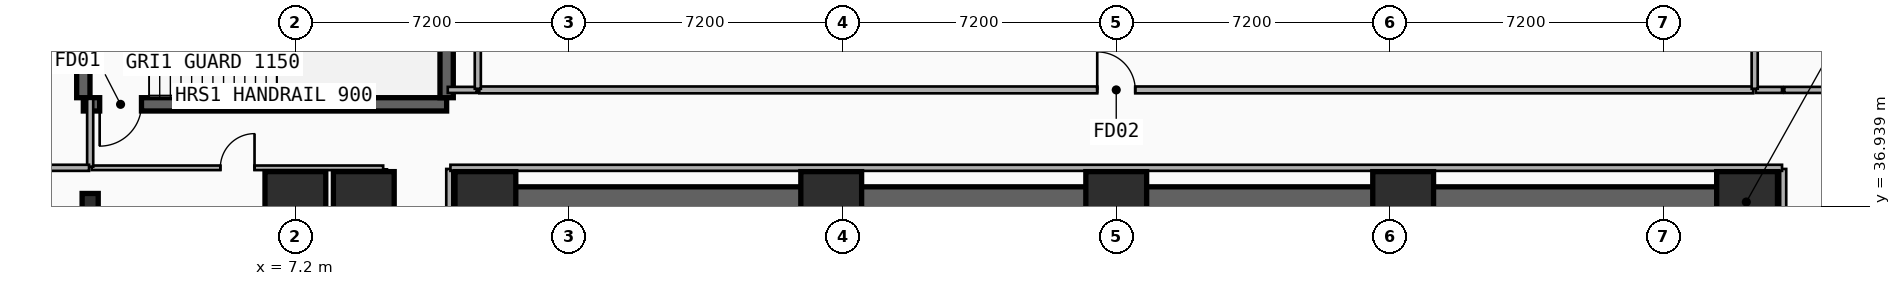
"""IFC4 building model, lengths in metres.
Left out: names, types, materials, properties, quantities, classifications, styles, units other than length and angle.
Written with IfcOpenShell. Run it as: python <this file> out.ifc"""

import sys

from ifc_helpers import new_model, si_unit, direction, frame, frame_2d, origin, origin_2d, place, context, subcontext, project, spatial, rectangle, i_section, extrude, element, fill, save


model = new_model("IFC4")
c1 = context("Model", 3, precision=1e-05, world=origin(), true_north=direction((0.0, 1.0)))
c2 = subcontext(c1, "Body", "Model", "MODEL_VIEW")
j1 = project(units=[si_unit("LENGTHUNIT", "METRE"), si_unit("PLANEANGLEUNIT", "RADIAN")], contexts=[c1])
p1 = place(None, origin())
s1 = spatial("IfcSite", under=j1, at=p1, CompositionType="ELEMENT")
p2 = place(p1, origin())
s2 = spatial("IfcBuilding", under=s1, at=p2, CompositionType="ELEMENT")
p3 = place(p2, frame((0.0, 0.0, 19.4)))
s3 = spatial("IfcBuildingStorey", under=s2, at=p3, CompositionType="ELEMENT", Elevation=19.4)
p4 = place(p3, frame((12.15, 37.05, 0.0), z_axis=(0.0, 0.0, 1.0), x_axis=(1.0, 0.0, 0.0)))
e1 = element("IfcWall", 1, at=p4, inside=s3, PredefinedType="SHEAR", context=c2, shape_type="SweptSolid", body=[
    extrude(rectangle(XDim=33.23, YDim=0.8, at=frame_2d((16.615, 0.0))), origin(), (0.0, 0.0, 1.0), 4.8),
])
p5 = place(p3, frame((11.18, 39.62, 0.0), z_axis=(0.0, 0.0, 1.0), x_axis=(-1.0, 0.0, 0.0)))
e2 = element("IfcWall", 2, at=p5, inside=s3, PredefinedType="SHEAR", context=c2, shape_type="SweptSolid", body=[
    extrude(rectangle(XDim=9.56, YDim=0.35, at=frame_2d((4.78, 0.0))), origin(), (0.0, 0.0, 1.0), 4.8),
])
p6 = place(p5, frame((8.03, 0.0, 0.0)))
e3 = element("IfcOpeningElement", 3, at=p6, cuts=e2, PredefinedType="OPENING", context=c2, shape_type="SweptSolid", body=[
    extrude(rectangle(XDim=1.1, YDim=2.15, at=frame_2d((0.55, 1.075))), frame((0.0, 0.185, 0.0), z_axis=(0.0, -1.0, 0.0), x_axis=(1.0, 0.0, 0.0)), (0.0, 0.0, 1.0), 0.37),
])
for number, where, z_axis, x_axis in (
    (4, (1.62, 39.795, 0.0), (0.0, 0.0, 1.0), (0.0, 1.0, 0.0)),
    (5, (11.18, 39.795, 0.0), (0.0, 0.0, 1.0), (0.0, 1.0, 0.0)),
):
    element("IfcWall", number, at=place(p3, frame(where, z_axis=z_axis, x_axis=x_axis)), inside=s3, PredefinedType="SHEAR", context=c2, shape_type="SweptSolid", body=[
        extrude(rectangle(XDim=3.27, YDim=0.35, at=frame_2d((1.635, 0.0))), origin(), (0.0, 0.0, 1.0), 4.8),
    ])
for number, where, z_axis, x_axis in (
    (6, (12.2, 37.05, 0.0), (0.0, 0.0, 1.0), (1.0, 0.0, 0.0)),
    (7, (21.3, 37.05, 0.0), (0.0, 0.0, 1.0), (1.0, 0.0, 0.0)),
    (8, (28.8, 37.05, 0.0), (0.0, 0.0, 1.0), (1.0, 0.0, 0.0)),
    (9, (36.35, 37.05, 0.0), (0.0, 0.0, 1.0), (1.0, 0.0, 0.0)),
    (10, (45.4, 37.05, 0.0), (0.0, 0.0, 1.0), (1.0, 0.0, 0.0)),
):
    element("IfcColumn", number, at=place(p3, frame(where, z_axis=z_axis, x_axis=x_axis)), inside=s3, PredefinedType="COLUMN", context=c2, shape_type="SweptSolid", body=[
        extrude(rectangle(XDim=1.6, YDim=1.6, at=origin_2d()), origin(), (0.0, 0.0, 1.0), 4.8),
    ])
p7 = place(p3, frame((1.8, 37.05, 0.0), z_axis=(0.0, 0.0, 1.0), x_axis=(1.0, 0.0, 0.0)))
e11 = element("IfcColumn", 11, at=p7, inside=s3, PredefinedType="COLUMN", context=c2, shape_type="SweptSolid", body=[
    extrude(i_section(OverallWidth=0.424, OverallDepth=0.45, WebThickness=0.041, FlangeThickness=0.065, FilletRadius=0.015, at=origin_2d()), origin(), (0.0, 0.0, 1.0), 4.8),
])
for number, where, z_axis, x_axis in (
    (12, (7.2, 37.05, 0.0), (0.0, 0.0, 1.0), (1.0, 0.0, 0.0)),
    (13, (9.0, 37.05, 0.0), (0.0, 0.0, 1.0), (1.0, 0.0, 0.0)),
):
    element("IfcColumn", number, at=place(p3, frame(where, z_axis=z_axis, x_axis=x_axis)), inside=s3, PredefinedType="COLUMN", context=c2, shape_type="SweptSolid", body=[
        extrude(rectangle(XDim=1.6, YDim=1.6, at=origin_2d()), origin(), (0.0, 0.0, 1.0), 4.8),
    ])
p8 = place(p3, frame((9.55, 27.64, 0.0), z_axis=(0.0, 0.0, 1.0), x_axis=(0.0, 1.0, 0.0)))
e14 = element("IfcWall", 14, at=p8, inside=s3, PredefinedType="PARTITIONING", context=c2, shape_type="SweptSolid", body=[
    extrude(rectangle(XDim=10.27, YDim=0.12, at=frame_2d((5.135, 0.0))), origin(), (0.0, 0.0, 1.0), 4.5),
])
p9 = place(p8, frame((4.685, 0.0, 0.0)))
e15 = element("IfcOpeningElement", 15, at=p9, cuts=e14, PredefinedType="OPENING", context=c2, shape_type="SweptSolid", body=[
    extrude(rectangle(XDim=0.9, YDim=2.1, at=frame_2d((0.45, 1.05))), frame((0.0, 0.07, 0.0), z_axis=(0.0, -1.0, 0.0), x_axis=(1.0, 0.0, 0.0)), (0.0, 0.0, 1.0), 0.14),
])
p10 = place(p3, frame((1.84, 37.95, 0.0), z_axis=(0.0, 0.0, 1.0), x_axis=(1.0, 0.0, 0.0)))
e16 = element("IfcWall", 16, at=p10, inside=s3, PredefinedType="PARTITIONING", context=c2, shape_type="SweptSolid", body=[
    extrude(rectangle(XDim=7.67, YDim=0.12, at=frame_2d((3.835, 0.0))), origin(), (0.0, 0.0, 1.0), 4.5),
])
p11 = place(p10, frame((3.385, 0.0, 0.0)))
e17 = element("IfcOpeningElement", 17, at=p11, cuts=e16, PredefinedType="OPENING", context=c2, shape_type="SweptSolid", body=[
    extrude(rectangle(XDim=0.9, YDim=2.1, at=frame_2d((0.45, 1.05))), frame((0.0, 0.07, 0.0), z_axis=(0.0, -1.0, 0.0), x_axis=(1.0, 0.0, 0.0)), (0.0, 0.0, 1.0), 0.14),
])
p12 = place(p3, frame((12.04, 40.0, 0.0), z_axis=(0.0, 0.0, 1.0), x_axis=(1.0, 0.0, 0.0)))
e18 = element("IfcWall", 18, at=p12, inside=s3, PredefinedType="PLUMBINGWALL", context=c2, shape_type="SweptSolid", body=[
    extrude(rectangle(XDim=33.52, YDim=0.18, at=frame_2d((16.76, 0.0))), origin(), (0.0, 0.0, 1.0), 3.83),
])
p13 = place(p12, frame((16.26, 0.0, 0.0)))
e19 = element("IfcOpeningElement", 19, at=p13, cuts=e18, PredefinedType="OPENING", context=c2, shape_type="SweptSolid", body=[
    extrude(rectangle(XDim=1.0, YDim=2.15, at=frame_2d((0.5, 1.075))), frame((0.0, 0.1, 0.0), z_axis=(0.0, -1.0, 0.0), x_axis=(1.0, 0.0, 0.0)), (0.0, 0.0, 1.0), 0.2),
])
p14 = place(p3, frame((11.25, 27.63, 0.0), z_axis=(0.0, 0.0, 1.0), x_axis=(0.0, 1.0, 0.0)))
e20 = element("IfcWall", 20, at=p14, inside=s3, PredefinedType="PARTITIONING", context=c2, shape_type="SweptSolid", body=[
    extrude(rectangle(XDim=10.29, YDim=0.16, at=frame_2d((5.145, 0.0))), origin(), (0.0, 0.0, 1.0), 4.5),
])
p15 = place(p3, frame((46.38, 40.0, 0.0), z_axis=(0.0, 0.0, 1.0), x_axis=(1.0, 0.0, 0.0)))
e21 = element("IfcWall", 21, at=p15, inside=s3, PredefinedType="PARTITIONING", context=c2, shape_type="SweptSolid", body=[
    extrude(rectangle(XDim=1.64, YDim=0.16, at=frame_2d((0.82, 0.0))), origin(), (0.0, 0.0, 1.0), 4.5),
])
p16 = place(p3, frame((46.35, 27.63, 0.0), z_axis=(0.0, 0.0, 1.0), x_axis=(0.0, 1.0, 0.0)))
e22 = element("IfcWall", 22, at=p16, inside=s3, PredefinedType="PARTITIONING", context=c2, shape_type="SweptSolid", body=[
    extrude(rectangle(XDim=10.29, YDim=0.16, at=frame_2d((5.145, 0.0))), origin(), (0.0, 0.0, 1.0), 4.5),
])
p17 = place(p3, frame((11.28, 37.95, 0.0), z_axis=(0.0, 0.0, 1.0), x_axis=(1.0, 0.0, 0.0)))
e23 = element("IfcWall", 23, at=p17, inside=s3, PredefinedType="PARTITIONING", context=c2, shape_type="SweptSolid", body=[
    extrude(rectangle(XDim=35.04, YDim=0.16, at=frame_2d((17.52, 0.0))), origin(), (0.0, 0.0, 1.0), 3.83),
])
p18 = place(p3, frame((11.21, 40.0, 0.0), z_axis=(0.0, 0.0, 1.0), x_axis=(1.0, 0.0, 0.0)))
e24 = element("IfcWall", 24, at=p18, inside=s3, PredefinedType="PARTITIONING", context=c2, shape_type="SweptSolid", body=[
    extrude(rectangle(XDim=0.76, YDim=0.16, at=frame_2d((0.38, 0.0))), origin(), (0.0, 0.0, 1.0), 3.83),
])
p19 = place(p3, frame((45.63, 40.0, 0.0), z_axis=(0.0, 0.0, 1.0), x_axis=(1.0, 0.0, 0.0)))
e25 = element("IfcWall", 25, at=p19, inside=s3, PredefinedType="PARTITIONING", context=c2, shape_type="SweptSolid", body=[
    extrude(rectangle(XDim=0.69, YDim=0.16, at=frame_2d((0.345, 0.0))), origin(), (0.0, 0.0, 1.0), 3.83),
])
p20 = place(p3, frame((1.8, 37.98, 0.0), z_axis=(0.0, 0.0, 1.0), x_axis=(0.0, 1.0, 0.0)))
e26 = element("IfcWall", 26, at=p20, inside=s3, PredefinedType="PARTITIONING", context=c2, shape_type="SweptSolid", body=[
    extrude(rectangle(XDim=1.785, YDim=0.16, at=frame_2d((0.893, 0.0))), origin(), (0.0, 0.0, 1.0), 4.5),
])
p21 = place(p3, frame((0.31, 37.95, 0.0), z_axis=(0.0, 0.0, 1.0), x_axis=(1.0, 0.0, 0.0)))
e27 = element("IfcWall", 27, at=p21, inside=s3, PredefinedType="PARTITIONING", context=c2, shape_type="SweptSolid", body=[
    extrude(rectangle(XDim=1.46, YDim=0.16, at=frame_2d((0.73, 0.0))), origin(), (0.0, 0.0, 1.0), 4.5),
])
for number, where, z_axis, x_axis in (
    (28, (12.0, 40.03, 0.0), (0.0, 0.0, 1.0), (0.0, 1.0, 0.0)),
    (29, (45.6, 40.03, 0.0), (0.0, 0.0, 1.0), (0.0, 1.0, 0.0)),
):
    element("IfcWall", number, at=place(p3, frame(where, z_axis=z_axis, x_axis=x_axis)), inside=s3, PredefinedType="PARTITIONING", context=c2, shape_type="SweptSolid", body=[
        extrude(rectangle(XDim=4.86, YDim=0.16, at=frame_2d((2.43, 0.0))), origin(), (0.0, 0.0, 1.0), 3.83),
    ])
p22 = place(p6, origin())
e30 = element("IfcDoor", 30, at=p22, inside=s3, OperationType="SINGLE_SWING_RIGHT", PredefinedType="DOOR", context=c2, shape_type="SweptSolid", body=[
    extrude(rectangle(XDim=1.1, YDim=2.15, at=frame_2d((0.55, 1.075))), frame((0.0, 0.025, 0.0), z_axis=(0.0, -1.0, 0.0), x_axis=(1.0, 0.0, 0.0)), (0.0, 0.0, 1.0), 0.05),
])
fill(e3, e30)
p23 = place(p11, origin())
e31 = element("IfcDoor", 31, at=p23, inside=s3, OperationType="SINGLE_SWING_RIGHT", PredefinedType="DOOR", context=c2, shape_type="SweptSolid", body=[
    extrude(rectangle(XDim=0.9, YDim=2.1, at=frame_2d((0.45, 1.05))), frame((0.0, 0.025, 0.0), z_axis=(0.0, -1.0, 0.0), x_axis=(1.0, 0.0, 0.0)), (0.0, 0.0, 1.0), 0.05),
])
fill(e17, e31)
p24 = place(p13, origin())
e32 = element("IfcDoor", 32, at=p24, inside=s3, OperationType="SINGLE_SWING_LEFT", PredefinedType="DOOR", context=c2, shape_type="SweptSolid", body=[
    extrude(rectangle(XDim=1.0, YDim=2.15, at=frame_2d((0.5, 1.075))), frame((0.0, 0.025, 0.0), z_axis=(0.0, -1.0, 0.0), x_axis=(1.0, 0.0, 0.0)), (0.0, 0.0, 1.0), 0.05),
])
fill(e19, e32)
save(model, sys.argv[1])
